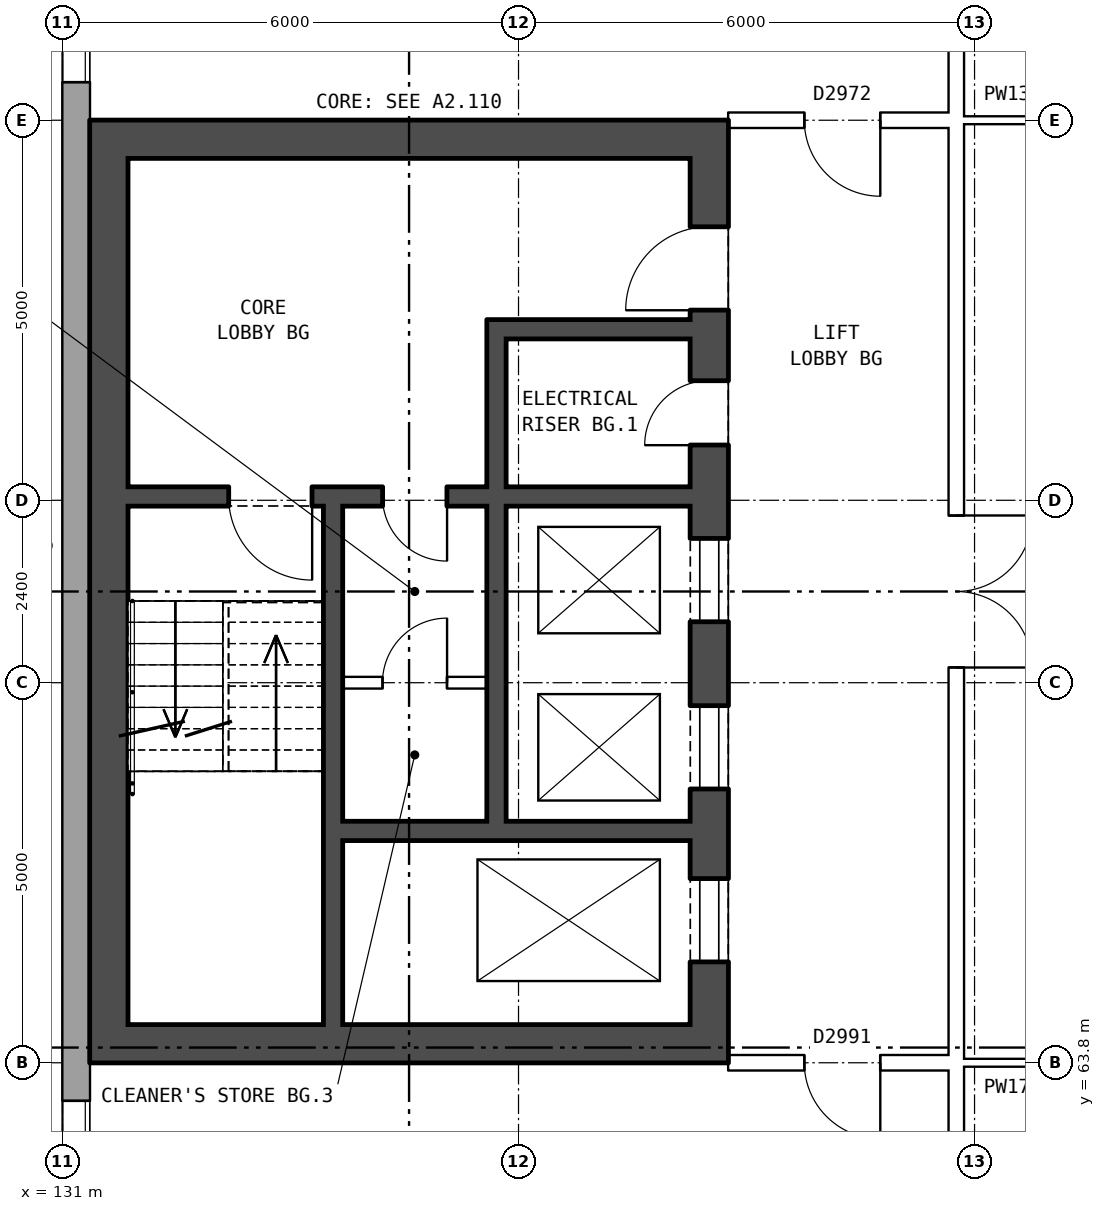
"""IFC4 building model, lengths in metres.
Left out: names, types, materials, properties, quantities, classifications, styles, units other than length and angle.
Written with IfcOpenShell. Run it as: python <this file> out.ifc"""

import sys

from ifc_helpers import new_model, si_unit, direction, frame, frame_2d, origin, place, context, subcontext, project, spatial, rectangle, extrude, element, fill, save


model = new_model("IFC4")
c1 = context("Model", 3, precision=1e-05, world=origin(), true_north=direction((0.0, 1.0)))
c2 = subcontext(c1, "Body", "Model", "MODEL_VIEW")
j1 = project(units=[si_unit("LENGTHUNIT", "METRE"), si_unit("PLANEANGLEUNIT", "RADIAN")], contexts=[c1])
p1 = place(None, origin())
s1 = spatial("IfcSite", under=j1, at=p1, CompositionType="ELEMENT")
p2 = place(p1, origin())
s2 = spatial("IfcBuilding", under=s1, at=p2, CompositionType="ELEMENT")
p3 = place(p2, frame((0.0, 0.0, 142.3)))
s3 = spatial("IfcBuildingStorey", under=s2, at=p3, CompositionType="ELEMENT", Elevation=142.3)
p4 = place(p3, frame((131.18, 82.925, 0.0), z_axis=(0.0, 0.0, 1.0), x_axis=(0.0, -1.0, 0.0)))
e1 = element("IfcWall", 1, at=p4, inside=s3, PredefinedType="STANDARD", context=c2, shape_type="SweptSolid", body=[
    extrude(rectangle(XDim=25.851, YDim=0.36, at=frame_2d((12.925, 0.0))), origin(), (0.0, 0.0, 1.0), 5.6),
])
p5 = place(p4, frame((1.625, 0.0, 0.15)))
e2 = element("IfcOpeningElement", 2, at=p5, cuts=e1, PredefinedType="OPENING", context=c2, shape_type="SweptSolid", body=[
    extrude(rectangle(XDim=1.6, YDim=2.4, at=frame_2d((0.8, 1.2))), frame((0.0, 0.19, 0.0), z_axis=(0.0, -1.0, 0.0), x_axis=(1.0, 0.0, 0.0)), (0.0, 0.0, 1.0), 0.38),
])
p6 = place(p4, frame((4.625, 0.0, 0.15)))
e3 = element("IfcOpeningElement", 3, at=p6, cuts=e1, PredefinedType="OPENING", context=c2, shape_type="SweptSolid", body=[
    extrude(rectangle(XDim=1.6, YDim=2.4, at=frame_2d((0.8, 1.2))), frame((0.0, 0.19, 0.0), z_axis=(0.0, -1.0, 0.0), x_axis=(1.0, 0.0, 0.0)), (0.0, 0.0, 1.0), 0.38),
])
p7 = place(p4, frame((19.625, 0.0, 0.15)))
e4 = element("IfcOpeningElement", 4, at=p7, cuts=e1, PredefinedType="OPENING", context=c2, shape_type="SweptSolid", body=[
    extrude(rectangle(XDim=1.6, YDim=2.4, at=frame_2d((0.8, 1.2))), frame((0.0, 0.19, 0.0), z_axis=(0.0, -1.0, 0.0), x_axis=(1.0, 0.0, 0.0)), (0.0, 0.0, 1.0), 0.38),
])
p8 = place(p4, frame((22.625, 0.0, 0.15)))
e5 = element("IfcOpeningElement", 5, at=p8, cuts=e1, PredefinedType="OPENING", context=c2, shape_type="SweptSolid", body=[
    extrude(rectangle(XDim=1.6, YDim=2.4, at=frame_2d((0.8, 1.2))), frame((0.0, 0.19, 0.0), z_axis=(0.0, -1.0, 0.0), x_axis=(1.0, 0.0, 0.0)), (0.0, 0.0, 1.0), 0.38),
])
p9 = place(p3, frame((139.51, 63.8, 0.0), z_axis=(0.0, 0.0, 1.0), x_axis=(0.0, 1.0, 0.0)))
e6 = element("IfcWall", 6, at=p9, inside=s3, PredefinedType="SHEAR", context=c2, shape_type="SweptSolid", body=[
    extrude(rectangle(XDim=12.4, YDim=0.5, at=frame_2d((6.2, 0.0))), origin(), (0.0, 0.0, 1.0), 5.6),
])
p10 = place(p9, frame((1.325, 0.0, 0.0)))
e7 = element("IfcOpeningElement", 7, at=p10, cuts=e6, PredefinedType="OPENING", context=c2, shape_type="SweptSolid", body=[
    extrude(rectangle(XDim=1.1, YDim=2.1, at=frame_2d((0.55, 1.05))), frame((0.0, 0.26, 0.0), z_axis=(0.0, -1.0, 0.0), x_axis=(1.0, 0.0, 0.0)), (0.0, 0.0, 1.0), 0.52),
])
p11 = place(p9, frame((3.6, 0.0, 0.0)))
e8 = element("IfcOpeningElement", 8, at=p11, cuts=e6, PredefinedType="OPENING", context=c2, shape_type="SweptSolid", body=[
    extrude(rectangle(XDim=1.1, YDim=2.1, at=frame_2d((0.55, 1.05))), frame((0.0, 0.26, 0.0), z_axis=(0.0, -1.0, 0.0), x_axis=(1.0, 0.0, 0.0)), (0.0, 0.0, 1.0), 0.52),
])
p12 = place(p9, frame((5.8, 0.0, 0.0)))
e9 = element("IfcOpeningElement", 9, at=p12, cuts=e6, PredefinedType="OPENING", context=c2, shape_type="SweptSolid", body=[
    extrude(rectangle(XDim=1.1, YDim=2.1, at=frame_2d((0.55, 1.05))), frame((0.0, 0.26, 0.0), z_axis=(0.0, -1.0, 0.0), x_axis=(1.0, 0.0, 0.0)), (0.0, 0.0, 1.0), 0.52),
])
p13 = place(p9, frame((9.9, 0.0, 0.0)))
e10 = element("IfcOpeningElement", 10, at=p13, cuts=e6, PredefinedType="OPENING", context=c2, shape_type="SweptSolid", body=[
    extrude(rectangle(XDim=1.1, YDim=2.1, at=frame_2d((0.55, 1.05))), frame((0.0, 0.26, 0.0), z_axis=(0.0, -1.0, 0.0), x_axis=(1.0, 0.0, 0.0)), (0.0, 0.0, 1.0), 0.52),
])
p14 = place(p9, frame((8.125, 0.0, 0.0)))
e11 = element("IfcOpeningElement", 11, at=p14, cuts=e6, PredefinedType="OPENING", context=c2, shape_type="SweptSolid", body=[
    extrude(rectangle(XDim=0.85, YDim=2.1, at=frame_2d((0.425, 1.05))), frame((0.0, 0.26, 0.0), z_axis=(0.0, -1.0, 0.0), x_axis=(1.0, 0.0, 0.0)), (0.0, 0.0, 1.0), 0.52),
])
p15 = place(p3, frame((131.61, 63.8, 0.0), z_axis=(0.0, 0.0, 1.0), x_axis=(0.0, 1.0, 0.0)))
e12 = element("IfcWall", 12, at=p15, inside=s3, PredefinedType="SHEAR", context=c2, shape_type="SweptSolid", body=[
    extrude(rectangle(XDim=12.4, YDim=0.5, at=frame_2d((6.2, 0.0))), origin(), (0.0, 0.0, 1.0), 5.6),
])
for number, where, z_axis, x_axis in (
    (13, (139.26, 64.05, 0.0), (0.0, 0.0, 1.0), (-1.0, 0.0, 0.0)),
    (14, (139.26, 75.95, 0.0), (0.0, 0.0, 1.0), (-1.0, 0.0, 0.0)),
):
    element("IfcWall", number, at=place(p3, frame(where, z_axis=z_axis, x_axis=x_axis)), inside=s3, PredefinedType="SHEAR", context=c2, shape_type="SweptSolid", body=[
        extrude(rectangle(XDim=7.4, YDim=0.5, at=frame_2d((3.7, 0.0))), origin(), (0.0, 0.0, 1.0), 5.6),
    ])
p16 = place(p3, frame((139.26, 66.85, 0.0), z_axis=(0.0, 0.0, 1.0), x_axis=(-1.0, 0.0, 0.0)))
e15 = element("IfcWall", 15, at=p16, inside=s3, PredefinedType="SHEAR", context=c2, shape_type="SweptSolid", body=[
    extrude(rectangle(XDim=4.575, YDim=0.25, at=frame_2d((2.288, 0.0))), origin(), (0.0, 0.0, 1.0), 5.6),
])
p17 = place(p3, frame((136.585, 68.8, 0.0), z_axis=(0.0, 0.0, 1.0), x_axis=(-1.0, 0.0, 0.0)))
e16 = element("IfcWall", 16, at=p17, inside=s3, PredefinedType="PARTITIONING", context=c2, shape_type="SweptSolid", body=[
    extrude(rectangle(XDim=1.9, YDim=0.15, at=frame_2d((0.95, 0.0))), origin(), (0.0, 0.0, 1.0), 5.6),
])
p18 = place(p17, frame((0.525, 0.0, 0.0)))
e17 = element("IfcOpeningElement", 17, at=p18, cuts=e16, PredefinedType="OPENING", context=c2, shape_type="SweptSolid", body=[
    extrude(rectangle(XDim=0.85, YDim=2.1, at=frame_2d((0.425, 1.05))), frame((0.0, 0.085, 0.0), z_axis=(0.0, -1.0, 0.0), x_axis=(1.0, 0.0, 0.0)), (0.0, 0.0, 1.0), 0.17),
])
p19 = place(p3, frame((139.26, 71.25, 0.0), z_axis=(0.0, 0.0, 1.0), x_axis=(-1.0, 0.0, 0.0)))
e18 = element("IfcWall", 18, at=p19, inside=s3, PredefinedType="SHEAR", context=c2, shape_type="SweptSolid", body=[
    extrude(rectangle(XDim=7.4, YDim=0.25, at=frame_2d((3.7, 0.0))), origin(), (0.0, 0.0, 1.0), 5.6),
])
p20 = place(p19, frame((4.975, 0.0, 0.0)))
e19 = element("IfcOpeningElement", 19, at=p20, cuts=e18, PredefinedType="OPENING", context=c2, shape_type="SweptSolid", body=[
    extrude(rectangle(XDim=1.1, YDim=2.1, at=frame_2d((0.55, 1.05))), frame((0.0, 0.135, 0.0), z_axis=(0.0, -1.0, 0.0), x_axis=(1.0, 0.0, 0.0)), (0.0, 0.0, 1.0), 0.27),
])
p21 = place(p19, frame((3.2, 0.0, 0.0)))
e20 = element("IfcOpeningElement", 20, at=p21, cuts=e18, PredefinedType="OPENING", context=c2, shape_type="SweptSolid", body=[
    extrude(rectangle(XDim=0.85, YDim=2.1, at=frame_2d((0.425, 1.05))), frame((0.0, 0.135, 0.0), z_axis=(0.0, -1.0, 0.0), x_axis=(1.0, 0.0, 0.0)), (0.0, 0.0, 1.0), 0.27),
])
p22 = place(p3, frame((139.26, 73.45, 0.0), z_axis=(0.0, 0.0, 1.0), x_axis=(-1.0, 0.0, 0.0)))
e21 = element("IfcWall", 21, at=p22, inside=s3, PredefinedType="SHEAR", context=c2, shape_type="SweptSolid", body=[
    extrude(rectangle(XDim=2.425, YDim=0.25, at=frame_2d((1.212, 0.0))), origin(), (0.0, 0.0, 1.0), 5.6),
])
p23 = place(p3, frame((136.71, 66.975, 0.0), z_axis=(0.0, 0.0, 1.0), x_axis=(0.0, 1.0, 0.0)))
e22 = element("IfcWall", 22, at=p23, inside=s3, PredefinedType="SHEAR", context=c2, shape_type="SweptSolid", body=[
    extrude(rectangle(XDim=4.15, YDim=0.25, at=frame_2d((2.075, 0.0))), origin(), (0.0, 0.0, 1.0), 5.6),
])
p24 = place(p3, frame((136.71, 71.375, 0.0), z_axis=(0.0, 0.0, 1.0), x_axis=(0.0, 1.0, 0.0)))
e23 = element("IfcWall", 23, at=p24, inside=s3, PredefinedType="SHEAR", context=c2, shape_type="SweptSolid", body=[
    extrude(rectangle(XDim=2.2, YDim=0.25, at=frame_2d((1.1, 0.0))), origin(), (0.0, 0.0, 1.0), 5.6),
])
p25 = place(p3, frame((134.56, 64.3, 0.0), z_axis=(0.0, 0.0, 1.0), x_axis=(0.0, 1.0, 0.0)))
e24 = element("IfcWall", 24, at=p25, inside=s3, PredefinedType="SHEAR", context=c2, shape_type="SweptSolid", body=[
    extrude(rectangle(XDim=6.825, YDim=0.25, at=frame_2d((3.413, 0.0))), origin(), (0.0, 0.0, 1.0), 5.6),
])
p26 = place(p3, frame((142.76, 63.9, 0.0), z_axis=(0.0, 0.0, 1.0), x_axis=(0.0, 1.0, 0.0)))
e25 = element("IfcWall", 25, at=p26, inside=s3, PredefinedType="PARTITIONING", context=c2, shape_type="SweptSolid", body=[
    extrude(rectangle(XDim=12.2, YDim=0.2, at=frame_2d((6.1, 0.0))), origin(), (0.0, 0.0, 1.0), 5.6),
])
p27 = place(p26, frame((5.1, 0.0, 0.0)))
e26 = element("IfcOpeningElement", 26, at=p27, cuts=e25, PredefinedType="OPENING", context=c2, shape_type="SweptSolid", body=[
    extrude(rectangle(XDim=2.0, YDim=2.1, at=frame_2d((1.0, 1.05))), frame((0.0, 0.11, 0.0), z_axis=(0.0, -1.0, 0.0), x_axis=(1.0, 0.0, 0.0)), (0.0, 0.0, 1.0), 0.22),
])
p28 = place(p3, frame((139.76, 63.8, 0.0), z_axis=(0.0, 0.0, 1.0), x_axis=(1.0, 0.0, 0.0)))
e27 = element("IfcWall", 27, at=p28, inside=s3, PredefinedType="PARTITIONING", context=c2, shape_type="SweptSolid", body=[
    extrude(rectangle(XDim=3.1, YDim=0.2, at=frame_2d((1.55, 0.0))), origin(), (0.0, 0.0, 1.0), 5.6),
])
p29 = place(p28, frame((1.0, 0.0, 0.0)))
e28 = element("IfcOpeningElement", 28, at=p29, cuts=e27, PredefinedType="OPENING", context=c2, shape_type="SweptSolid", body=[
    extrude(rectangle(XDim=1.0, YDim=2.1, at=frame_2d((0.5, 1.05))), frame((0.0, 0.11, 0.0), z_axis=(0.0, -1.0, 0.0), x_axis=(1.0, 0.0, 0.0)), (0.0, 0.0, 1.0), 0.22),
])
p30 = place(p3, frame((142.66, 63.8, 0.0), z_axis=(0.0, 0.0, 1.0), x_axis=(1.0, 0.0, 0.0)))
e29 = element("IfcWall", 29, at=p30, inside=s3, PredefinedType="PARTITIONING", context=c2, shape_type="SweptSolid", body=[
    extrude(rectangle(XDim=14.68, YDim=0.1, at=frame_2d((7.34, 0.0))), origin(), (0.0, 0.0, 1.0), 5.6),
])
p31 = place(p30, frame((3.22, 0.0, 0.0)))
e30 = element("IfcOpeningElement", 30, at=p31, cuts=e29, PredefinedType="OPENING", context=c2, shape_type="SweptSolid", body=[
    extrude(rectangle(XDim=1.0, YDim=2.1, at=frame_2d((0.5, 1.05))), frame((0.0, 0.06, 0.0), z_axis=(0.0, -1.0, 0.0), x_axis=(1.0, 0.0, 0.0)), (0.0, 0.0, 1.0), 0.12),
])
p32 = place(p30, frame((10.46, 0.0, 0.0)))
e31 = element("IfcOpeningElement", 31, at=p32, cuts=e29, PredefinedType="OPENING", context=c2, shape_type="SweptSolid", body=[
    extrude(rectangle(XDim=1.0, YDim=2.1, at=frame_2d((0.5, 1.05))), frame((0.0, 0.06, 0.0), z_axis=(0.0, -1.0, 0.0), x_axis=(1.0, 0.0, 0.0)), (0.0, 0.0, 1.0), 0.12),
])
p33 = place(p3, frame((139.76, 76.2, 0.0), z_axis=(0.0, 0.0, 1.0), x_axis=(1.0, 0.0, 0.0)))
e32 = element("IfcWall", 32, at=p33, inside=s3, PredefinedType="PARTITIONING", context=c2, shape_type="SweptSolid", body=[
    extrude(rectangle(XDim=3.1, YDim=0.2, at=frame_2d((1.55, 0.0))), origin(), (0.0, 0.0, 1.0), 5.6),
])
p34 = place(p33, frame((1.0, 0.0, 0.0)))
e33 = element("IfcOpeningElement", 33, at=p34, cuts=e32, PredefinedType="OPENING", context=c2, shape_type="SweptSolid", body=[
    extrude(rectangle(XDim=1.0, YDim=2.1, at=frame_2d((0.5, 1.05))), frame((0.0, 0.11, 0.0), z_axis=(0.0, -1.0, 0.0), x_axis=(1.0, 0.0, 0.0)), (0.0, 0.0, 1.0), 0.22),
])
p35 = place(p3, frame((142.66, 76.2, 0.0), z_axis=(0.0, 0.0, 1.0), x_axis=(1.0, 0.0, 0.0)))
e34 = element("IfcWall", 34, at=p35, inside=s3, PredefinedType="PARTITIONING", context=c2, shape_type="SweptSolid", body=[
    extrude(rectangle(XDim=14.68, YDim=0.1, at=frame_2d((7.34, 0.0))), origin(), (0.0, 0.0, 1.0), 5.6),
])
p36 = place(p35, frame((3.22, 0.0, 0.0)))
e35 = element("IfcOpeningElement", 35, at=p36, cuts=e34, PredefinedType="OPENING", context=c2, shape_type="SweptSolid", body=[
    extrude(rectangle(XDim=1.0, YDim=2.1, at=frame_2d((0.5, 1.05))), frame((0.0, 0.06, 0.0), z_axis=(0.0, -1.0, 0.0), x_axis=(1.0, 0.0, 0.0)), (0.0, 0.0, 1.0), 0.12),
])
p37 = place(p35, frame((10.46, 0.0, 0.0)))
e36 = element("IfcOpeningElement", 36, at=p37, cuts=e34, PredefinedType="OPENING", context=c2, shape_type="SweptSolid", body=[
    extrude(rectangle(XDim=1.0, YDim=2.1, at=frame_2d((0.5, 1.05))), frame((0.0, 0.06, 0.0), z_axis=(0.0, -1.0, 0.0), x_axis=(1.0, 0.0, 0.0)), (0.0, 0.0, 1.0), 0.12),
])
p38 = place(p3, frame((142.76, 60.7, 0.0), z_axis=(0.0, 0.0, 1.0), x_axis=(0.0, 1.0, 0.0)))
e37 = element("IfcWall", 37, at=p38, inside=s3, PredefinedType="PARTITIONING", context=c2, shape_type="SweptSolid", body=[
    extrude(rectangle(XDim=3.2, YDim=0.2, at=frame_2d((1.6, 0.0))), origin(), (0.0, 0.0, 1.0), 5.6),
])
p39 = place(p38, frame((1.1, 0.0, 0.0)))
e38 = element("IfcOpeningElement", 38, at=p39, cuts=e37, PredefinedType="OPENING", context=c2, shape_type="SweptSolid", body=[
    extrude(rectangle(XDim=1.0, YDim=2.1, at=frame_2d((0.5, 1.05))), frame((0.0, 0.11, 0.0), z_axis=(0.0, -1.0, 0.0), x_axis=(1.0, 0.0, 0.0)), (0.0, 0.0, 1.0), 0.22),
])
p40 = place(p3, frame((142.76, 76.1, 0.0), z_axis=(0.0, 0.0, 1.0), x_axis=(0.0, 1.0, 0.0)))
e39 = element("IfcWall", 39, at=p40, inside=s3, PredefinedType="PARTITIONING", context=c2, shape_type="SweptSolid", body=[
    extrude(rectangle(XDim=3.2, YDim=0.2, at=frame_2d((1.6, 0.0))), origin(), (0.0, 0.0, 1.0), 5.6),
])
p41 = place(p40, frame((1.1, 0.0, 0.0)))
e40 = element("IfcOpeningElement", 40, at=p41, cuts=e39, PredefinedType="OPENING", context=c2, shape_type="SweptSolid", body=[
    extrude(rectangle(XDim=1.0, YDim=2.1, at=frame_2d((0.5, 1.05))), frame((0.0, 0.11, 0.0), z_axis=(0.0, -1.0, 0.0), x_axis=(1.0, 0.0, 0.0)), (0.0, 0.0, 1.0), 0.22),
])
p42 = place(p6, origin())
e41 = element("IfcWindow", 41, at=p42, inside=s3, PartitioningType="SINGLE_PANEL", PredefinedType="WINDOW", context=c2, shape_type="SweptSolid", body=[
    extrude(rectangle(XDim=1.6, YDim=2.4, at=frame_2d((0.8, 1.2))), frame((0.0, 0.15, 0.0), z_axis=(0.0, -1.0, 0.0), x_axis=(1.0, 0.0, 0.0)), (0.0, 0.0, 1.0), 0.06),
])
fill(e3, e41)
p43 = place(p7, origin())
e42 = element("IfcWindow", 42, at=p43, inside=s3, PartitioningType="SINGLE_PANEL", PredefinedType="WINDOW", context=c2, shape_type="SweptSolid", body=[
    extrude(rectangle(XDim=1.6, YDim=2.4, at=frame_2d((0.8, 1.2))), frame((0.0, 0.15, 0.0), z_axis=(0.0, -1.0, 0.0), x_axis=(1.0, 0.0, 0.0)), (0.0, 0.0, 1.0), 0.06),
])
fill(e4, e42)
p44 = place(p10, origin())
e43 = element("IfcDoor", 43, at=p44, inside=s3, OperationType="DOUBLE_DOOR_SLIDING", PredefinedType="DOOR", context=c2, shape_type="SweptSolid", body=[
    extrude(rectangle(XDim=1.1, YDim=2.1, at=frame_2d((0.55, 1.05))), frame((0.0, 0.235, 0.0), z_axis=(0.0, -1.0, 0.0), x_axis=(1.0, 0.0, 0.0)), (0.0, 0.0, 1.0), 0.05),
])
fill(e7, e43)
p45 = place(p11, origin())
e44 = element("IfcDoor", 44, at=p45, inside=s3, OperationType="DOUBLE_DOOR_SLIDING", PredefinedType="DOOR", context=c2, shape_type="SweptSolid", body=[
    extrude(rectangle(XDim=1.1, YDim=2.1, at=frame_2d((0.55, 1.05))), frame((0.0, 0.235, 0.0), z_axis=(0.0, -1.0, 0.0), x_axis=(1.0, 0.0, 0.0)), (0.0, 0.0, 1.0), 0.05),
])
fill(e8, e44)
p46 = place(p12, origin())
e45 = element("IfcDoor", 45, at=p46, inside=s3, OperationType="DOUBLE_DOOR_SLIDING", PredefinedType="DOOR", context=c2, shape_type="SweptSolid", body=[
    extrude(rectangle(XDim=1.1, YDim=2.1, at=frame_2d((0.55, 1.05))), frame((0.0, 0.235, 0.0), z_axis=(0.0, -1.0, 0.0), x_axis=(1.0, 0.0, 0.0)), (0.0, 0.0, 1.0), 0.05),
])
fill(e9, e45)
p47 = place(p13, origin())
e46 = element("IfcDoor", 46, at=p47, inside=s3, OperationType="SINGLE_SWING_LEFT", PredefinedType="DOOR", context=c2, shape_type="SweptSolid", body=[
    extrude(rectangle(XDim=1.1, YDim=2.1, at=frame_2d((0.55, 1.05))), frame((0.0, 0.235, 0.0), z_axis=(0.0, -1.0, 0.0), x_axis=(1.0, 0.0, 0.0)), (0.0, 0.0, 1.0), 0.05),
])
fill(e10, e46)
p48 = place(p20, origin())
e47 = element("IfcDoor", 47, at=p48, inside=s3, OperationType="SINGLE_SWING_LEFT", PredefinedType="DOOR", context=c2, shape_type="SweptSolid", body=[
    extrude(rectangle(XDim=1.1, YDim=2.1, at=frame_2d((0.55, 1.05))), frame((0.0, 0.025, 0.0), z_axis=(0.0, -1.0, 0.0), x_axis=(1.0, 0.0, 0.0)), (0.0, 0.0, 1.0), 0.05),
])
fill(e19, e47)
p49 = place(p14, origin())
e48 = element("IfcDoor", 48, at=p49, inside=s3, OperationType="SINGLE_SWING_LEFT", PredefinedType="DOOR", context=c2, shape_type="SweptSolid", body=[
    extrude(rectangle(XDim=0.85, YDim=2.1, at=frame_2d((0.425, 1.05))), frame((0.0, 0.235, 0.0), z_axis=(0.0, -1.0, 0.0), x_axis=(1.0, 0.0, 0.0)), (0.0, 0.0, 1.0), 0.05),
])
fill(e11, e48)
p50 = place(p21, origin())
e49 = element("IfcDoor", 49, at=p50, inside=s3, OperationType="SINGLE_SWING_LEFT", PredefinedType="DOOR", context=c2, shape_type="SweptSolid", body=[
    extrude(rectangle(XDim=0.85, YDim=2.1, at=frame_2d((0.425, 1.05))), frame((0.0, 0.025, 0.0), z_axis=(0.0, -1.0, 0.0), x_axis=(1.0, 0.0, 0.0)), (0.0, 0.0, 1.0), 0.05),
])
fill(e20, e49)
p51 = place(p18, frame((0.85, 0.0, 0.0), z_axis=(0.0, 0.0, 1.0), x_axis=(-1.0, 0.0, 0.0)))
e50 = element("IfcDoor", 50, at=p51, inside=s3, OperationType="SINGLE_SWING_RIGHT", PredefinedType="DOOR", context=c2, shape_type="SweptSolid", body=[
    extrude(rectangle(XDim=0.85, YDim=2.1, at=frame_2d((0.425, 1.05))), frame((0.0, 0.025, 0.0), z_axis=(0.0, -1.0, 0.0), x_axis=(1.0, 0.0, 0.0)), (0.0, 0.0, 1.0), 0.05),
])
fill(e17, e50)
p52 = place(p27, frame((2.0, 0.0, 0.0), z_axis=(0.0, 0.0, 1.0), x_axis=(-1.0, 0.0, 0.0)))
e51 = element("IfcDoor", 51, at=p52, inside=s3, OperationType="DOUBLE_DOOR_SINGLE_SWING", PredefinedType="DOOR", context=c2, shape_type="SweptSolid", body=[
    extrude(rectangle(XDim=2.0, YDim=2.1, at=frame_2d((1.0, 1.05))), frame((0.0, 0.025, 0.0), z_axis=(0.0, -1.0, 0.0), x_axis=(1.0, 0.0, 0.0)), (0.0, 0.0, 1.0), 0.05),
])
fill(e26, e51)
p53 = place(p29, frame((1.0, 0.0, 0.0), z_axis=(0.0, 0.0, 1.0), x_axis=(-1.0, 0.0, 0.0)))
e52 = element("IfcDoor", 52, at=p53, inside=s3, OperationType="SINGLE_SWING_LEFT", PredefinedType="DOOR", context=c2, shape_type="SweptSolid", body=[
    extrude(rectangle(XDim=1.0, YDim=2.1, at=frame_2d((0.5, 1.05))), frame((0.0, 0.025, 0.0), z_axis=(0.0, -1.0, 0.0), x_axis=(1.0, 0.0, 0.0)), (0.0, 0.0, 1.0), 0.05),
])
fill(e28, e52)
p54 = place(p34, frame((1.0, 0.0, 0.0), z_axis=(0.0, 0.0, 1.0), x_axis=(-1.0, 0.0, 0.0)))
e53 = element("IfcDoor", 53, at=p54, inside=s3, OperationType="SINGLE_SWING_LEFT", PredefinedType="DOOR", context=c2, shape_type="SweptSolid", body=[
    extrude(rectangle(XDim=1.0, YDim=2.1, at=frame_2d((0.5, 1.05))), frame((0.0, 0.025, 0.0), z_axis=(0.0, -1.0, 0.0), x_axis=(1.0, 0.0, 0.0)), (0.0, 0.0, 1.0), 0.05),
])
fill(e33, e53)
save(model, sys.argv[1])
